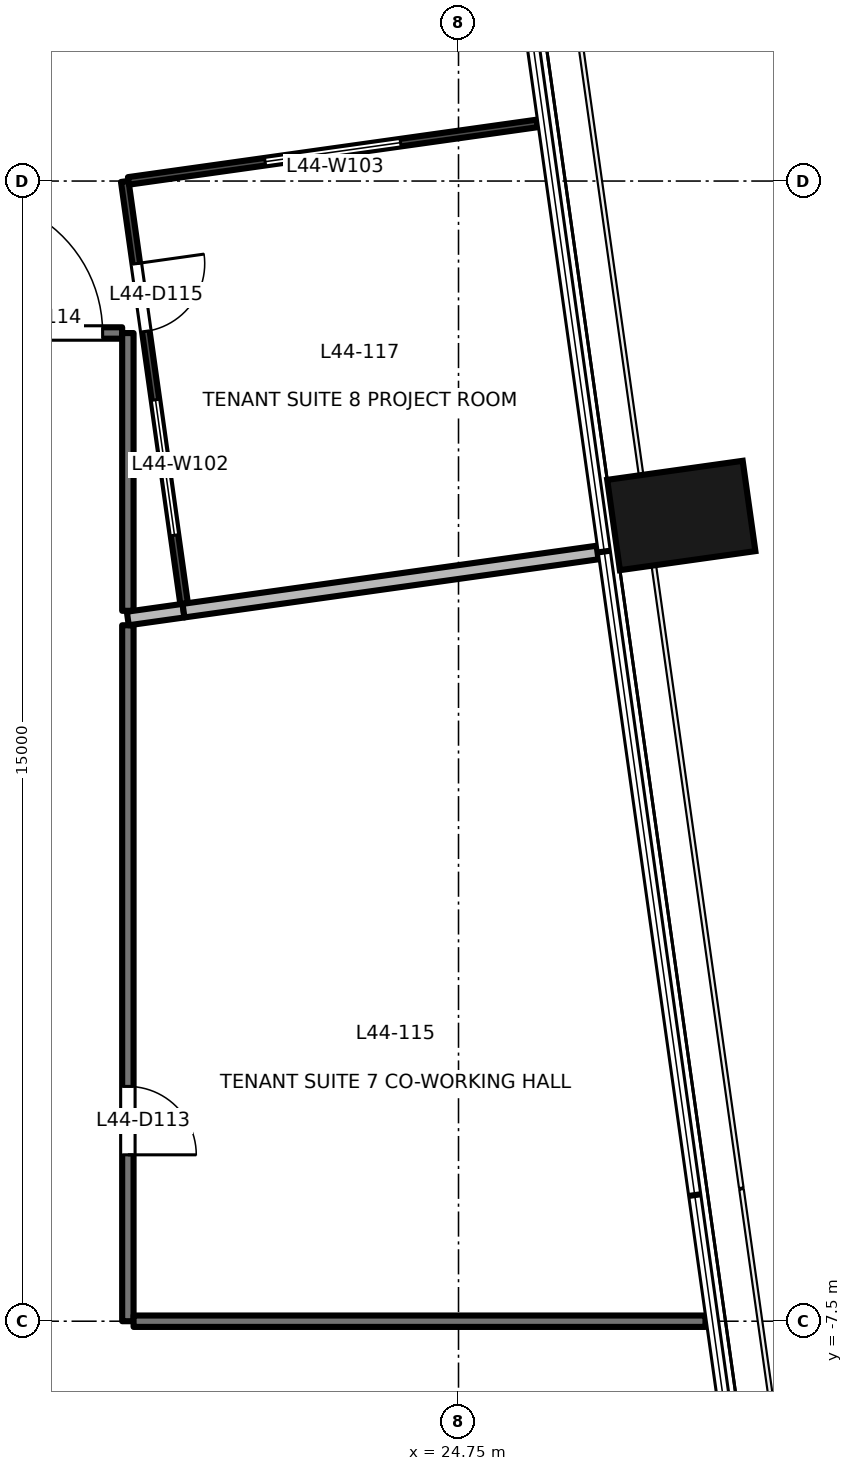
"""IFC4 building model, lengths in metres.
Left out: names, types, materials, properties, quantities, classifications, styles, units other than length and angle.
Written with IfcOpenShell. Run it as: python <this file> out.ifc"""

import sys

from ifc_helpers import new_model, si_unit, direction, frame, frame_2d, origin, origin_2d, place, context, subcontext, project, spatial, rectangle, extrude, element, fill, save


model = new_model("IFC4")
c1 = context("Model", 3, precision=1e-05, world=origin(), true_north=direction((0.0, 1.0)))
c2 = subcontext(c1, "Body", "Model", "MODEL_VIEW")
j1 = project(units=[si_unit("LENGTHUNIT", "METRE"), si_unit("PLANEANGLEUNIT", "RADIAN")], contexts=[c1])
p1 = place(None, origin())
s1 = spatial("IfcSite", under=j1, at=p1, CompositionType="ELEMENT")
p2 = place(p1, origin())
s2 = spatial("IfcBuilding", under=s1, at=p2, CompositionType="ELEMENT")
p3 = place(p2, frame((0.0, 0.0, 191.9)))
s3 = spatial("IfcBuildingStorey", under=s2, at=p3, CompositionType="ELEMENT", Elevation=191.9)
p4 = place(p3, frame((27.681, 3.1, -0.2), z_axis=(0.0, 0.0, 1.0), x_axis=(-0.139190384377, 0.990265639562, 0.0)))
e1 = element("IfcColumn", 1, at=p4, inside=s3, PredefinedType="COLUMN", context=c2, shape_type="SweptSolid", body=[
    extrude(rectangle(XDim=1.2, YDim=1.8, at=origin_2d()), origin(), (0.0, 0.0, 1.0), 3.9),
])
p5 = place(p3, frame((20.4, 1.656, 0.0), z_axis=(0.0, 0.0, 1.0), x_axis=(0.0, -1.0, 0.0)))
e2 = element("IfcWall", 2, at=p5, inside=s3, PredefinedType="PARTITIONING", context=c2, shape_type="SweptSolid", body=[
    extrude(rectangle(XDim=9.156, YDim=0.15, at=frame_2d((4.578, 0.0))), origin(), (0.0, 0.0, 1.0), 3.25),
])
p6 = place(p5, frame((6.067, 0.0, 0.0)))
e3 = element("IfcOpeningElement", 3, at=p6, cuts=e2, PredefinedType="OPENING", context=c2, shape_type="SweptSolid", body=[
    extrude(rectangle(XDim=0.9, YDim=2.1, at=frame_2d((0.45, 1.05))), frame((0.0, 0.085, 0.0), z_axis=(0.0, -1.0, 0.0), x_axis=(1.0, 0.0, 0.0)), (0.0, 0.0, 1.0), 0.171),
])
p7 = place(p3, frame((20.475, -7.5, 0.0), z_axis=(0.0, 0.0, 1.0), x_axis=(1.0, 0.0, 0.0)))
e4 = element("IfcWall", 4, at=p7, inside=s3, PredefinedType="PARTITIONING", context=c2, shape_type="SweptSolid", body=[
    extrude(rectangle(XDim=7.524, YDim=0.15, at=frame_2d((3.762, 0.0))), origin(), (0.0, 0.0, 1.0), 3.7),
])
p8 = place(p3, frame((18.0, 5.501, 0.0), z_axis=(0.0, 0.0, 1.0), x_axis=(1.0, 0.0, 0.0)))
e5 = element("IfcWall", 5, at=p8, inside=s3, PredefinedType="PARTITIONING", context=c2, shape_type="SweptSolid", body=[
    extrude(rectangle(XDim=2.325, YDim=0.15, at=frame_2d((1.163, 0.0))), origin(), (0.0, 0.0, 1.0), 3.7),
])
p9 = place(p8, frame((0.268, 0.0, 0.0)))
e6 = element("IfcOpeningElement", 6, at=p9, cuts=e5, PredefinedType="OPENING", context=c2, shape_type="SweptSolid", body=[
    extrude(rectangle(XDim=1.8, YDim=2.1, at=frame_2d((0.9, 1.05))), frame((0.0, 0.085, 0.0), z_axis=(0.0, -1.0, 0.0), x_axis=(1.0, 0.0, 0.0)), (0.0, 0.0, 1.0), 0.171),
])
p10 = place(p3, frame((20.4, 5.5, 0.0), z_axis=(0.0, 0.0, 1.0), x_axis=(0.0, -1.0, 0.0)))
e7 = element("IfcWall", 7, at=p10, inside=s3, PredefinedType="PARTITIONING", context=c2, shape_type="SweptSolid", body=[
    extrude(rectangle(XDim=3.654, YDim=0.15, at=frame_2d((1.827, 0.0))), origin(), (0.0, 0.0, 1.0), 3.25),
])
p11 = place(p3, frame((20.399, 1.745, 0.0), z_axis=(0.0, 0.0, 1.0), x_axis=(0.990315465901, 0.138835434947, 0.0)))
e8 = element("IfcWall", 8, at=p11, inside=s3, PredefinedType="PARTITIONING", context=c2, shape_type="SweptSolid", body=[
    extrude(rectangle(XDim=0.74, YDim=0.18, at=frame_2d((0.37, 0.0))), origin(), (0.0, 0.0, 1.0), 3.7),
])
p12 = place(p3, frame((21.132, 1.848, 0.0), z_axis=(0.0, 0.0, 1.0), x_axis=(0.990277893792, 0.139103174181, 0.0)))
e9 = element("IfcWall", 9, at=p12, inside=s3, PredefinedType="PARTITIONING", context=c2, shape_type="SweptSolid", body=[
    extrude(rectangle(XDim=5.5, YDim=0.18, at=frame_2d((2.75, 0.0))), origin(), (0.0, 0.0, 1.0), 3.7),
])
p13 = place(p3, frame((20.359, 7.495, 0.0), z_axis=(0.0, 0.0, 1.0), x_axis=(0.139221490403, -0.990261266843, 0.0)))
e10 = element("IfcWall", 10, at=p13, inside=s3, PredefinedType="PARTITIONING", context=c2, shape_type="SweptSolid", body=[
    extrude(rectangle(XDim=5.61, YDim=0.1, at=frame_2d((2.805, 0.0))), origin(), (0.0, 0.0, 1.0), 3.25),
])
p14 = place(p13, frame((1.092, 0.0, 0.0)))
e11 = element("IfcOpeningElement", 11, at=p14, cuts=e10, PredefinedType="OPENING", context=c2, shape_type="SweptSolid", body=[
    extrude(rectangle(XDim=0.9, YDim=2.1, at=frame_2d((0.45, 1.05))), frame((0.0, 0.061, 0.0), z_axis=(0.0, -1.0, 0.0), x_axis=(1.0, 0.0, 0.0)), (0.0, 0.0, 1.0), 0.121),
])
p15 = place(p13, frame((2.901, 0.0, 0.9)))
e12 = element("IfcOpeningElement", 12, at=p15, cuts=e10, PredefinedType="OPENING", context=c2, shape_type="SweptSolid", body=[
    extrude(rectangle(XDim=1.8, YDim=1.2, at=frame_2d((0.9, 0.6))), frame((0.0, 0.061, 0.0), z_axis=(0.0, -1.0, 0.0), x_axis=(1.0, 0.0, 0.0)), (0.0, 0.0, 1.0), 0.121),
])
p16 = place(p3, frame((25.785, 8.258, 0.0), z_axis=(0.0, 0.0, 1.0), x_axis=(-0.990257353855, -0.139249320055, 0.0)))
e13 = element("IfcWall", 13, at=p16, inside=s3, PredefinedType="PARTITIONING", context=c2, shape_type="SweptSolid", body=[
    extrude(rectangle(XDim=5.43, YDim=0.1, at=frame_2d((2.715, 0.0))), origin(), (0.0, 0.0, 1.0), 3.7),
])
p17 = place(p16, frame((1.815, 0.0, 0.9)))
e14 = element("IfcOpeningElement", 14, at=p17, cuts=e13, PredefinedType="OPENING", context=c2, shape_type="SweptSolid", body=[
    extrude(rectangle(XDim=1.8, YDim=1.2, at=frame_2d((0.9, 0.6))), frame((0.0, 0.061, 0.0), z_axis=(0.0, -1.0, 0.0), x_axis=(1.0, 0.0, 0.0)), (0.0, 0.0, 1.0), 0.121),
])
p18 = place(p6, origin())
e15 = element("IfcDoor", 15, at=p18, inside=s3, OperationType="SINGLE_SWING_RIGHT", PredefinedType="DOOR", context=c2, shape_type="SweptSolid", body=[
    extrude(rectangle(XDim=0.9, YDim=2.1, at=frame_2d((0.45, 1.05))), frame((0.0, 0.025, 0.0), z_axis=(0.0, -1.0, 0.0), x_axis=(1.0, 0.0, 0.0)), (0.0, 0.0, 1.0), 0.05),
])
fill(e3, e15)
p19 = place(p9, origin())
e16 = element("IfcDoor", 16, at=p19, inside=s3, OperationType="DOUBLE_DOOR_SINGLE_SWING", PredefinedType="DOOR", context=c2, shape_type="SweptSolid", body=[
    extrude(rectangle(XDim=1.8, YDim=2.1, at=frame_2d((0.9, 1.05))), frame((0.0, 0.025, 0.0), z_axis=(0.0, -1.0, 0.0), x_axis=(1.0, 0.0, 0.0)), (0.0, 0.0, 1.0), 0.05),
])
fill(e6, e16)
p20 = place(p14, origin())
e17 = element("IfcDoor", 17, at=p20, inside=s3, OperationType="SINGLE_SWING_LEFT", PredefinedType="DOOR", context=c2, shape_type="SweptSolid", body=[
    extrude(rectangle(XDim=0.9, YDim=2.1, at=frame_2d((0.45, 1.05))), frame((0.0, 0.025, 0.0), z_axis=(0.0, -1.0, 0.0), x_axis=(1.0, 0.0, 0.0)), (0.0, 0.0, 1.0), 0.05),
])
fill(e11, e17)
p21 = place(p15, origin())
e18 = element("IfcWindow", 18, at=p21, inside=s3, PartitioningType="SINGLE_PANEL", PredefinedType="WINDOW", context=c2, shape_type="SweptSolid", body=[
    extrude(rectangle(XDim=1.8, YDim=1.2, at=frame_2d((0.9, 0.6))), frame((0.0, 0.03, 0.0), z_axis=(0.0, -1.0, 0.0), x_axis=(1.0, 0.0, 0.0)), (0.0, 0.0, 1.0), 0.06),
])
fill(e12, e18)
p22 = place(p17, origin())
e19 = element("IfcWindow", 19, at=p22, inside=s3, PartitioningType="SINGLE_PANEL", PredefinedType="WINDOW", context=c2, shape_type="SweptSolid", body=[
    extrude(rectangle(XDim=1.8, YDim=1.2, at=frame_2d((0.9, 0.6))), frame((0.0, 0.03, 0.0), z_axis=(0.0, -1.0, 0.0), x_axis=(1.0, 0.0, 0.0)), (0.0, 0.0, 1.0), 0.06),
])
fill(e14, e19)
save(model, sys.argv[1])
